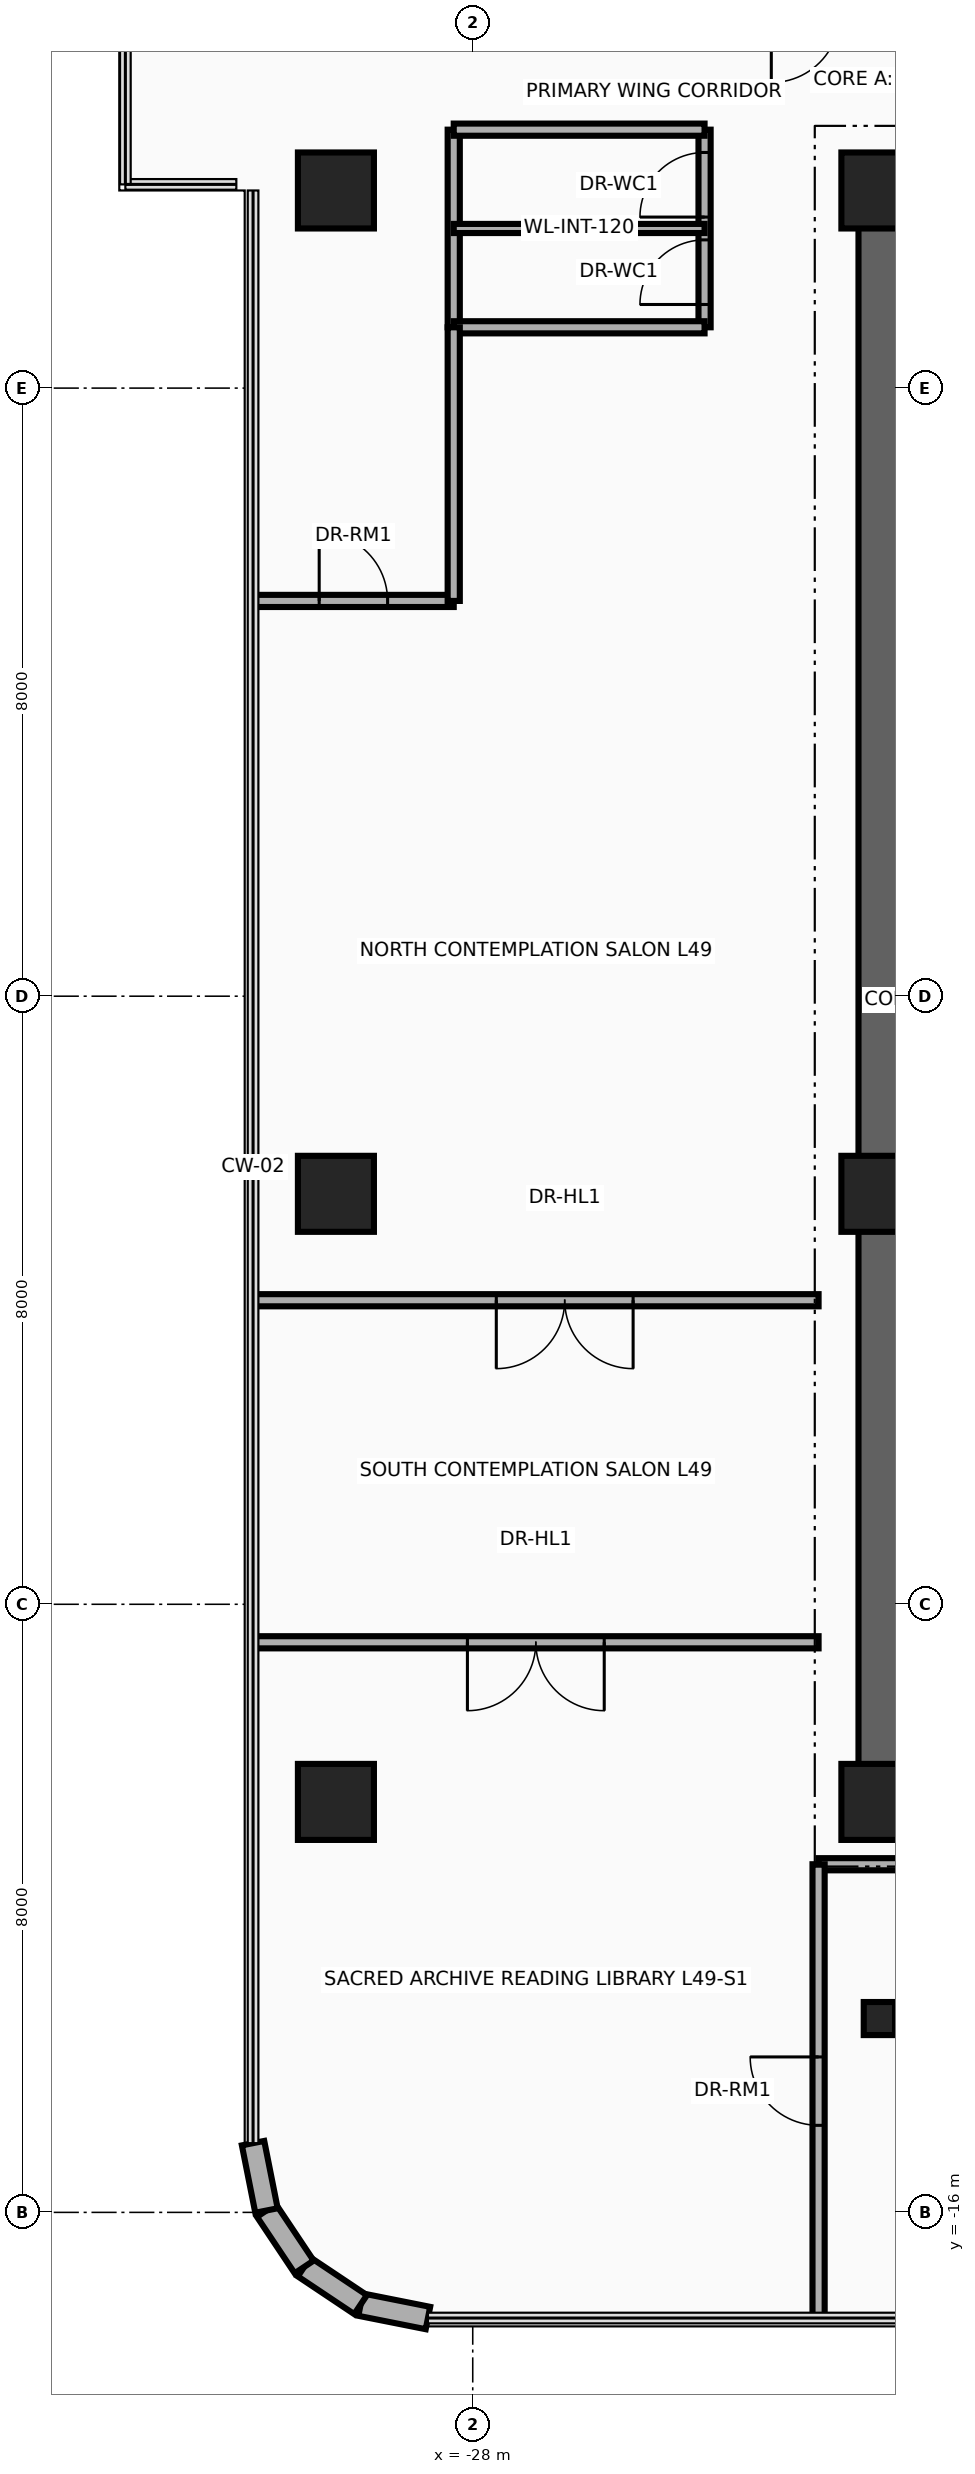
"""IFC4 building model, lengths in metres.
Left out: names, types, materials, properties, quantities, classifications, styles, units other than length and angle.
Written with IfcOpenShell. Run it as: python <this file> out.ifc"""

import sys

from ifc_helpers import new_model, si_unit, direction, frame, frame_2d, origin, origin_2d, place, context, subcontext, project, spatial, rectangle, i_section, extrude, source, transform, mapped, element, fill, save


model = new_model("IFC4")
c1 = context("Model", 3, precision=1e-05, world=origin(), true_north=direction((0.0, 1.0)))
c2 = subcontext(c1, "Body", "Model", "MODEL_VIEW")
j1 = project(units=[si_unit("LENGTHUNIT", "METRE"), si_unit("PLANEANGLEUNIT", "RADIAN")], contexts=[c1])
p1 = place(None, origin())
s1 = spatial("IfcSite", under=j1, at=p1, CompositionType="ELEMENT")
p2 = place(p1, origin())
s2 = spatial("IfcBuilding", under=s1, at=p2, CompositionType="ELEMENT")
p3 = place(p2, frame((0.0, 0.0, 192.35)))
s3 = spatial("IfcBuildingStorey", under=s2, at=p3, CompositionType="ELEMENT", Elevation=192.35)
p4 = place(p3, frame((-22.65, -11.075, 0.0), z_axis=(0.0, 0.0, 1.0), x_axis=(0.0, 1.0, 0.0)))
e1 = element("IfcWall", 1, at=p4, inside=s3, PredefinedType="SHEAR", context=c2, shape_type="SweptSolid", body=[
    extrude(rectangle(XDim=22.15, YDim=0.55, at=frame_2d((11.075, 0.0))), origin(), (0.0, 0.0, 1.0), 3.71),
])
for number, where, z_axis, x_axis in (
    (2, (-22.65, 10.8, 0.0), (0.0, 0.0, 1.0), (1.0, 0.0, 0.0)),
    (3, (-22.65, -10.8, 0.0), (0.0, 0.0, 1.0), (1.0, 0.0, 0.0)),
):
    element("IfcWall", number, at=place(p3, frame(where, z_axis=z_axis, x_axis=x_axis)), inside=s3, PredefinedType="SHEAR", context=c2, shape_type="SweptSolid", body=[
        extrude(rectangle(XDim=10.25, YDim=0.55, at=frame_2d((5.125, 0.0))), origin(), (0.0, 0.0, 1.0), 3.71),
    ])
m1 = source(origin(), c2, "Body", "SweptSolid", [
    extrude(rectangle(XDim=1.0, YDim=1.0, at=origin_2d()), origin(), (0.0, 0.0, 1.0), 3.95),
])
for number, where, z_axis, x_axis in (
    (4, (-29.8, -10.6, 0.0), (0.0, 0.0, 1.0), (1.0, 0.0, 0.0)),
    (5, (-22.65, -10.6, 0.0), (0.0, 0.0, 1.0), (1.0, 0.0, 0.0)),
    (6, (-29.8, -2.6, 0.0), (0.0, 0.0, 1.0), (1.0, 0.0, 0.0)),
    (7, (-22.65, -2.6, 0.0), (0.0, 0.0, 1.0), (1.0, 0.0, 0.0)),
    (8, (-29.8, 10.6, 0.0), (0.0, 0.0, 1.0), (1.0, 0.0, 0.0)),
    (9, (-22.65, 10.6, 0.0), (0.0, 0.0, 1.0), (1.0, 0.0, 0.0)),
):
    element("IfcColumn", number, at=place(p3, frame(where, z_axis=z_axis, x_axis=x_axis)), inside=s3, PredefinedType="COLUMN", context=c2, shape_type="MappedRepresentation", body=[
        mapped(m1, transform((0.0, 0.0, 0.0), x_axis=(1.0, 0.0, 0.0), y_axis=(0.0, 1.0, 0.0), z_axis=(0.0, 0.0, 1.0), scale=1.0)),
    ])
m2 = source(origin(), c2, "Body", "SweptSolid", [
    extrude(i_section(OverallWidth=0.412, OverallDepth=0.435, WebThickness=0.036, FlangeThickness=0.057, at=origin_2d()), origin(), (0.0, 0.0, 1.0), 3.95),
])
p5 = place(p3, frame((-22.65, -13.45, 0.0), z_axis=(0.0, 0.0, 1.0), x_axis=(1.0, 0.0, 0.0)))
e10 = element("IfcColumn", 10, at=p5, inside=s3, PredefinedType="COLUMN", context=c2, shape_type="MappedRepresentation", body=[
    mapped(m2, transform((0.0, 0.0, 0.0), x_axis=(1.0, 0.0, 0.0), y_axis=(0.0, 1.0, 0.0), z_axis=(0.0, 0.0, 1.0), scale=1.0)),
])
p6 = place(p3, frame((-28.589, -17.39, 0.0), z_axis=(0.0, 0.0, 1.0), x_axis=(-0.980798241101, 0.195025152871, 0.0)))
e11 = element("IfcWall", 11, at=p6, inside=s3, PredefinedType="SOLIDWALL", context=c2, shape_type="SweptSolid", body=[
    extrude(rectangle(XDim=0.904, YDim=0.3, at=frame_2d((0.452, 0.0))), origin(), (0.0, 0.0, 1.0), 3.71),
])
for number, where, z_axis, x_axis in (
    (12, (-29.476, -17.214, 0.0), (0.0, 0.0, 1.0), (-0.832, 0.556, 0.0)),
    (13, (-30.218, -16.718, 0.0), (0.0, 0.0, 1.0), (-0.556, 0.832, 0.0)),
):
    element("IfcWall", number, at=place(p3, frame(where, z_axis=z_axis, x_axis=x_axis)), inside=s3, PredefinedType="SOLIDWALL", context=c2, shape_type="SweptSolid", body=[
        extrude(rectangle(XDim=0.893, YDim=0.3, at=frame_2d((0.446, 0.0))), origin(), (0.0, 0.0, 1.0), 3.71),
    ])
p7 = place(p3, frame((-30.714, -15.976, 0.0), z_axis=(0.0, 0.0, 1.0), x_axis=(-0.195025152871, 0.980798241101, 0.0)))
e14 = element("IfcWall", 14, at=p7, inside=s3, PredefinedType="SOLIDWALL", context=c2, shape_type="SweptSolid", body=[
    extrude(rectangle(XDim=0.904, YDim=0.3, at=frame_2d((0.452, 0.0))), origin(), (0.0, 0.0, 1.0), 3.71),
])
p8 = place(p3, frame((-28.25, 8.8, 0.0), z_axis=(0.0, 0.0, 1.0), x_axis=(0.0, 1.0, 0.0)))
e15 = element("IfcWall", 15, at=p8, inside=s3, PredefinedType="PARTITIONING", context=c2, shape_type="SweptSolid", body=[
    extrude(rectangle(XDim=2.6, YDim=0.16, at=frame_2d((1.3, 0.0))), origin(), (0.0, 0.0, 1.0), 2.994),
])
p9 = place(p3, frame((-24.95, 8.8, 0.0), z_axis=(0.0, 0.0, 1.0), x_axis=(0.0, 1.0, 0.0)))
e16 = element("IfcWall", 16, at=p9, inside=s3, PredefinedType="PARTITIONING", context=c2, shape_type="SweptSolid", body=[
    extrude(rectangle(XDim=2.6, YDim=0.16, at=frame_2d((1.3, 0.0))), origin(), (0.0, 0.0, 1.0), 2.994),
])
p10 = place(p9, frame((0.3, 0.0, 0.0)))
e17 = element("IfcOpeningElement", 17, at=p10, cuts=e16, PredefinedType="OPENING", context=c2, shape_type="SweptSolid", body=[
    extrude(rectangle(XDim=0.85, YDim=2.1, at=frame_2d((0.425, 1.05))), frame((0.0, 0.095, 0.0), z_axis=(0.0, -1.0, 0.0), x_axis=(1.0, 0.0, 0.0)), (0.0, 0.0, 1.0), 0.19),
])
p11 = place(p9, frame((1.45, 0.0, 0.0)))
e18 = element("IfcOpeningElement", 18, at=p11, cuts=e16, PredefinedType="OPENING", context=c2, shape_type="SweptSolid", body=[
    extrude(rectangle(XDim=0.85, YDim=2.1, at=frame_2d((0.425, 1.05))), frame((0.0, 0.095, 0.0), z_axis=(0.0, -1.0, 0.0), x_axis=(1.0, 0.0, 0.0)), (0.0, 0.0, 1.0), 0.19),
])
for number, where, z_axis, x_axis in (
    (19, (-28.25, 8.8, 0.0), (0.0, 0.0, 1.0), (1.0, 0.0, 0.0)),
    (20, (-28.25, 11.4, 0.0), (0.0, 0.0, 1.0), (1.0, 0.0, 0.0)),
):
    element("IfcWall", number, at=place(p3, frame(where, z_axis=z_axis, x_axis=x_axis)), inside=s3, PredefinedType="PARTITIONING", context=c2, shape_type="SweptSolid", body=[
        extrude(rectangle(XDim=3.3, YDim=0.16, at=frame_2d((1.65, 0.0))), origin(), (0.0, 0.0, 1.0), 3.71),
    ])
p12 = place(p3, frame((-28.25, 10.1, 0.0), z_axis=(0.0, 0.0, 1.0), x_axis=(1.0, 0.0, 0.0)))
e21 = element("IfcWall", 21, at=p12, inside=s3, PredefinedType="PARTITIONING", context=c2, shape_type="SweptSolid", body=[
    extrude(rectangle(XDim=3.3, YDim=0.12, at=frame_2d((1.65, 0.0))), origin(), (0.0, 0.0, 1.0), 3.71),
])
p13 = place(p3, frame((-23.45, -11.42, 0.0), z_axis=(0.0, 0.0, 1.0), x_axis=(1.0, 0.0, 0.0)))
e22 = element("IfcWall", 22, at=p13, inside=s3, PredefinedType="PARTITIONING", context=c2, shape_type="SweptSolid", body=[
    extrude(rectangle(XDim=13.84, YDim=0.16, at=frame_2d((6.92, 0.0))), origin(), (0.0, 0.0, 1.0), 3.084),
])
p14 = place(p3, frame((-23.45, -17.39, 0.0), z_axis=(0.0, 0.0, 1.0), x_axis=(0.0, 1.0, 0.0)))
e23 = element("IfcWall", 23, at=p14, inside=s3, PredefinedType="PARTITIONING", context=c2, shape_type="SweptSolid", body=[
    extrude(rectangle(XDim=5.97, YDim=0.16, at=frame_2d((2.985, 0.0))), origin(), (0.0, 0.0, 1.0), 3.71),
])
p15 = place(p14, frame((2.535, 0.0, 0.0)))
e24 = element("IfcOpeningElement", 24, at=p15, cuts=e23, PredefinedType="OPENING", context=c2, shape_type="SweptSolid", body=[
    extrude(rectangle(XDim=0.9, YDim=2.1, at=frame_2d((0.45, 1.05))), frame((0.0, 0.095, 0.0), z_axis=(0.0, -1.0, 0.0), x_axis=(1.0, 0.0, 0.0)), (0.0, 0.0, 1.0), 0.19),
])
p16 = place(p3, frame((-30.89, -8.5, 0.0), z_axis=(0.0, 0.0, 1.0), x_axis=(1.0, 0.0, 0.0)))
e25 = element("IfcWall", 25, at=p16, inside=s3, PredefinedType="PARTITIONING", context=c2, shape_type="SweptSolid", body=[
    extrude(rectangle(XDim=7.44, YDim=0.16, at=frame_2d((3.72, 0.0))), origin(), (0.0, 0.0, 1.0), 3.156),
])
p17 = place(p16, frame((2.82, 0.0, 0.0)))
e26 = element("IfcOpeningElement", 26, at=p17, cuts=e25, PredefinedType="OPENING", context=c2, shape_type="SweptSolid", body=[
    extrude(rectangle(XDim=1.8, YDim=2.15, at=frame_2d((0.9, 1.075))), frame((0.0, 0.095, 0.0), z_axis=(0.0, -1.0, 0.0), x_axis=(1.0, 0.0, 0.0)), (0.0, 0.0, 1.0), 0.19),
])
p18 = place(p3, frame((-30.89, 5.2, 0.0), z_axis=(0.0, 0.0, 1.0), x_axis=(1.0, 0.0, 0.0)))
e27 = element("IfcWall", 27, at=p18, inside=s3, PredefinedType="PARTITIONING", context=c2, shape_type="SweptSolid", body=[
    extrude(rectangle(XDim=2.64, YDim=0.16, at=frame_2d((1.32, 0.0))), origin(), (0.0, 0.0, 1.0), 3.156),
])
p19 = place(p18, frame((0.87, 0.0, 0.0)))
e28 = element("IfcOpeningElement", 28, at=p19, cuts=e27, PredefinedType="OPENING", context=c2, shape_type="SweptSolid", body=[
    extrude(rectangle(XDim=0.9, YDim=2.1, at=frame_2d((0.45, 1.05))), frame((0.0, 0.095, 0.0), z_axis=(0.0, -1.0, 0.0), x_axis=(1.0, 0.0, 0.0)), (0.0, 0.0, 1.0), 0.19),
])
p20 = place(p3, frame((-28.25, 5.2, 0.0), z_axis=(0.0, 0.0, 1.0), x_axis=(0.0, 1.0, 0.0)))
e29 = element("IfcWall", 29, at=p20, inside=s3, PredefinedType="PARTITIONING", context=c2, shape_type="SweptSolid", body=[
    extrude(rectangle(XDim=3.6, YDim=0.16, at=frame_2d((1.8, 0.0))), origin(), (0.0, 0.0, 1.0), 3.238),
])
p21 = place(p3, frame((-30.89, -4.0, 0.0), z_axis=(0.0, 0.0, 1.0), x_axis=(1.0, 0.0, 0.0)))
e30 = element("IfcWall", 30, at=p21, inside=s3, PredefinedType="PARTITIONING", context=c2, shape_type="SweptSolid", body=[
    extrude(rectangle(XDim=7.44, YDim=0.16, at=frame_2d((3.72, 0.0))), origin(), (0.0, 0.0, 1.0), 3.156),
])
p22 = place(p21, frame((3.2, 0.0, 0.0)))
e31 = element("IfcOpeningElement", 31, at=p22, cuts=e30, PredefinedType="OPENING", context=c2, shape_type="SweptSolid", body=[
    extrude(rectangle(XDim=1.8, YDim=2.15, at=frame_2d((0.9, 1.075))), frame((0.0, 0.095, 0.0), z_axis=(0.0, -1.0, 0.0), x_axis=(1.0, 0.0, 0.0)), (0.0, 0.0, 1.0), 0.19),
])
p23 = place(p10, origin())
e32 = element("IfcDoor", 32, at=p23, inside=s3, OperationType="SINGLE_SWING_LEFT", PredefinedType="DOOR", context=c2, shape_type="SweptSolid", body=[
    extrude(rectangle(XDim=0.85, YDim=2.1, at=frame_2d((0.425, 1.05))), frame((0.0, 0.025, 0.0), z_axis=(0.0, -1.0, 0.0), x_axis=(1.0, 0.0, 0.0)), (0.0, 0.0, 1.0), 0.05),
])
fill(e17, e32)
p24 = place(p11, origin())
e33 = element("IfcDoor", 33, at=p24, inside=s3, OperationType="SINGLE_SWING_RIGHT", PredefinedType="DOOR", context=c2, shape_type="SweptSolid", body=[
    extrude(rectangle(XDim=0.85, YDim=2.1, at=frame_2d((0.425, 1.05))), frame((0.0, 0.025, 0.0), z_axis=(0.0, -1.0, 0.0), x_axis=(1.0, 0.0, 0.0)), (0.0, 0.0, 1.0), 0.05),
])
fill(e18, e33)
p25 = place(p17, frame((1.8, 0.0, 0.0), z_axis=(0.0, 0.0, 1.0), x_axis=(-1.0, 0.0, 0.0)))
e34 = element("IfcDoor", 34, at=p25, inside=s3, OperationType="DOUBLE_DOOR_SINGLE_SWING", PredefinedType="DOOR", context=c2, shape_type="SweptSolid", body=[
    extrude(rectangle(XDim=1.8, YDim=2.15, at=frame_2d((0.9, 1.075))), frame((0.0, 0.025, 0.0), z_axis=(0.0, -1.0, 0.0), x_axis=(1.0, 0.0, 0.0)), (0.0, 0.0, 1.0), 0.05),
])
fill(e26, e34)
p26 = place(p19, origin())
e35 = element("IfcDoor", 35, at=p26, inside=s3, OperationType="SINGLE_SWING_RIGHT", PredefinedType="DOOR", context=c2, shape_type="SweptSolid", body=[
    extrude(rectangle(XDim=0.9, YDim=2.1, at=frame_2d((0.45, 1.05))), frame((0.0, 0.025, 0.0), z_axis=(0.0, -1.0, 0.0), x_axis=(1.0, 0.0, 0.0)), (0.0, 0.0, 1.0), 0.05),
])
fill(e28, e35)
p27 = place(p22, frame((1.8, 0.0, 0.0), z_axis=(0.0, 0.0, 1.0), x_axis=(-1.0, 0.0, 0.0)))
e36 = element("IfcDoor", 36, at=p27, inside=s3, OperationType="DOUBLE_DOOR_SINGLE_SWING", PredefinedType="DOOR", context=c2, shape_type="SweptSolid", body=[
    extrude(rectangle(XDim=1.8, YDim=2.15, at=frame_2d((0.9, 1.075))), frame((0.0, 0.025, 0.0), z_axis=(0.0, -1.0, 0.0), x_axis=(1.0, 0.0, 0.0)), (0.0, 0.0, 1.0), 0.05),
])
fill(e31, e36)
p28 = place(p15, origin())
e37 = element("IfcDoor", 37, at=p28, inside=s3, OperationType="SINGLE_SWING_RIGHT", PredefinedType="DOOR", context=c2, shape_type="SweptSolid", body=[
    extrude(rectangle(XDim=0.9, YDim=2.1, at=frame_2d((0.45, 1.05))), frame((0.0, 0.025, 0.0), z_axis=(0.0, -1.0, 0.0), x_axis=(1.0, 0.0, 0.0)), (0.0, 0.0, 1.0), 0.05),
])
fill(e24, e37)
save(model, sys.argv[1])
